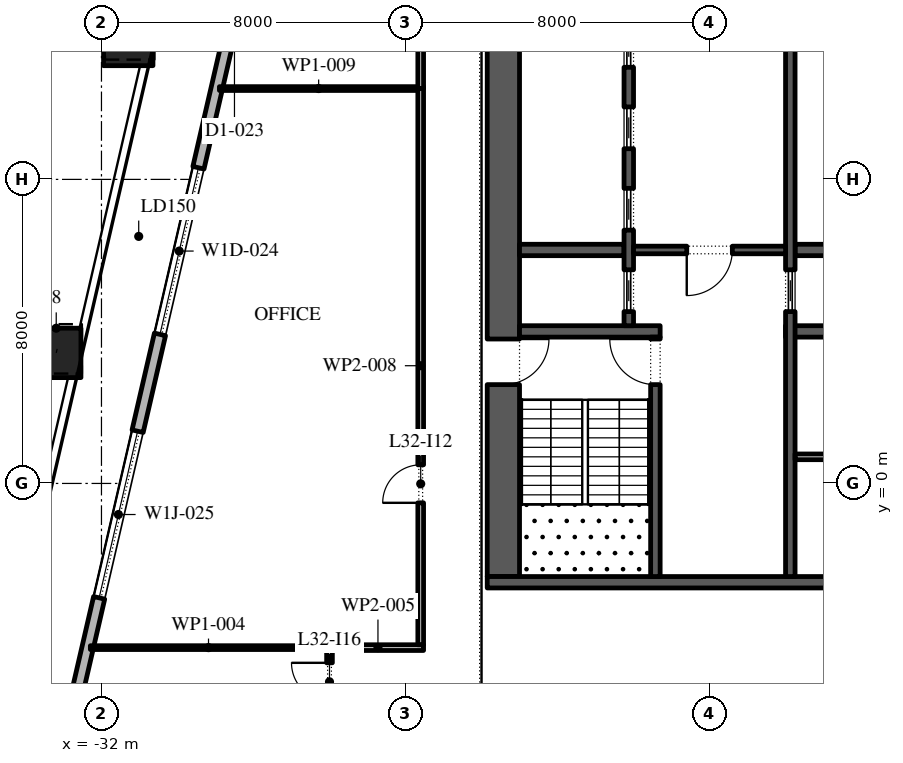
"""IFC4 building model, lengths in metres.
Left out: names, types, materials, properties, quantities, classifications, styles, units other than length and angle.
Written with IfcOpenShell. Run it as: python <this file> out.ifc"""

import sys

from ifc_helpers import new_model, si_unit, direction, frame, frame_2d, origin, origin_2d, place, context, subcontext, project, spatial, rectangle, extrude, element, fill, save


model = new_model("IFC4")
c1 = context("Model", 3, precision=1e-05, world=origin(), true_north=direction((0.0, 1.0)))
c2 = subcontext(c1, "Body", "Model", "MODEL_VIEW")
j1 = project(units=[si_unit("LENGTHUNIT", "METRE"), si_unit("PLANEANGLEUNIT", "RADIAN")], contexts=[c1])
p1 = place(None, origin())
s1 = spatial("IfcSite", under=j1, at=p1, CompositionType="ELEMENT")
p2 = place(p1, origin())
s2 = spatial("IfcBuilding", under=s1, at=p2, CompositionType="ELEMENT")
p3 = place(p2, frame((0.0, 0.0, 147.6)))
s3 = spatial("IfcBuildingStorey", under=s2, at=p3, CompositionType="ELEMENT", Elevation=147.6)
p4 = place(p3, frame((-31.295, 11.642, 0.0), z_axis=(0.008770884695, 0.037929719907, 0.99924191662), x_axis=(-0.974290512438, 0.225295355862, 0.0)))
e1 = element("IfcColumn", 1, at=p4, inside=s3, PredefinedType="COLUMN", context=c2, shape_type="SweptSolid", body=[
    extrude(rectangle(XDim=1.3, YDim=1.3, at=origin_2d()), origin(), (0.0, 0.0, 1.0), 4.203),
])
p5 = place(p3, frame((-33.19, 3.434, 0.0), z_axis=(0.005810975449, 0.025335852957, 0.999662106474), x_axis=(-0.974691740237, 0.22355315143, 0.0)))
e2 = element("IfcColumn", 2, at=p5, inside=s3, PredefinedType="COLUMN", context=c2, shape_type="SweptSolid", body=[
    extrude(rectangle(XDim=1.3, YDim=1.3, at=origin_2d()), origin(), (0.0, 0.0, 1.0), 4.201),
])
p6 = place(p3, frame((-22.82, 37.016, 0.0), z_axis=(0.0, 0.0, 1.0), x_axis=(-0.224953880882, -0.974369412223, 0.0)))
e3 = element("IfcWall", 3, at=p6, inside=s3, PredefinedType="STANDARD", context=c2, shape_type="SweptSolid", body=[
    extrude(rectangle(XDim=49.5, YDim=0.3, at=frame_2d((24.75, 0.0))), origin(), (0.0, 0.0, 1.0), 4.0),
])
p7 = place(p6, frame((1.157, 0.0, 0.45)))
e4 = element("IfcOpeningElement", 4, at=p7, cuts=e3, PredefinedType="OPENING", context=c2, shape_type="SweptSolid", body=[
    extrude(rectangle(XDim=4.5, YDim=3.05, at=frame_2d((2.25, 1.525))), frame((0.0, 0.16, 0.0), z_axis=(0.0, -1.0, 0.0), x_axis=(1.0, 0.0, 0.0)), (0.0, 0.0, 1.0), 0.32),
])
p8 = place(p6, frame((8.121, 0.0, 0.45)))
e5 = element("IfcOpeningElement", 5, at=p8, cuts=e3, PredefinedType="OPENING", context=c2, shape_type="SweptSolid", body=[
    extrude(rectangle(XDim=4.5, YDim=3.05, at=frame_2d((2.25, 1.525))), frame((0.0, 0.16, 0.0), z_axis=(0.0, -1.0, 0.0), x_axis=(1.0, 0.0, 0.0)), (0.0, 0.0, 1.0), 0.32),
])
p9 = place(p6, frame((15.236, 0.0, 0.45)))
e6 = element("IfcOpeningElement", 6, at=p9, cuts=e3, PredefinedType="OPENING", context=c2, shape_type="SweptSolid", body=[
    extrude(rectangle(XDim=4.5, YDim=3.05, at=frame_2d((2.25, 1.525))), frame((0.0, 0.16, 0.0), z_axis=(0.0, -1.0, 0.0), x_axis=(1.0, 0.0, 0.0)), (0.0, 0.0, 1.0), 0.32),
])
p10 = place(p6, frame((23.4, 0.0, 0.0)))
e7 = element("IfcOpeningElement", 7, at=p10, cuts=e3, PredefinedType="OPENING", context=c2, shape_type="SweptSolid", body=[
    extrude(rectangle(XDim=2.4, YDim=3.5, at=frame_2d((1.2, 1.75))), frame((0.0, 0.16, 0.0), z_axis=(0.0, -1.0, 0.0), x_axis=(1.0, 0.0, 0.0)), (0.0, 0.0, 1.0), 0.32),
])
p11 = place(p6, frame((29.464, 0.0, 0.45)))
e8 = element("IfcOpeningElement", 8, at=p11, cuts=e3, PredefinedType="OPENING", context=c2, shape_type="SweptSolid", body=[
    extrude(rectangle(XDim=4.5, YDim=2.875, at=frame_2d((2.25, 1.438))), frame((0.0, 0.16, 0.0), z_axis=(0.0, -1.0, 0.0), x_axis=(1.0, 0.0, 0.0)), (0.0, 0.0, 1.0), 0.32),
])
p12 = place(p6, frame((36.579, 0.0, 0.45)))
e9 = element("IfcOpeningElement", 9, at=p12, cuts=e3, PredefinedType="OPENING", context=c2, shape_type="SweptSolid", body=[
    extrude(rectangle(XDim=4.5, YDim=2.675, at=frame_2d((2.25, 1.337))), frame((0.0, 0.16, 0.0), z_axis=(0.0, -1.0, 0.0), x_axis=(1.0, 0.0, 0.0)), (0.0, 0.0, 1.0), 0.32),
])
p13 = place(p6, frame((43.693, 0.0, 0.45)))
e10 = element("IfcOpeningElement", 10, at=p13, cuts=e3, PredefinedType="OPENING", context=c2, shape_type="SweptSolid", body=[
    extrude(rectangle(XDim=4.5, YDim=3.05, at=frame_2d((2.25, 1.525))), frame((0.0, 0.16, 0.0), z_axis=(0.0, -1.0, 0.0), x_axis=(1.0, 0.0, 0.0)), (0.0, 0.0, 1.0), 0.32),
])
p14 = place(p3, frame((-21.425, -2.45, 0.0), z_axis=(0.0, 0.0, 1.0), x_axis=(0.0, 1.0, 0.0)))
e11 = element("IfcWall", 11, at=p14, inside=s3, PredefinedType="SHEAR", context=c2, shape_type="SweptSolid", body=[
    extrude(rectangle(XDim=27.9, YDim=0.85, at=frame_2d((13.95, 0.0))), origin(), (0.0, 0.0, 1.0), 4.0),
])
p15 = place(p14, frame((5.05, 0.0, 0.0)))
e12 = element("IfcOpeningElement", 12, at=p15, cuts=e11, PredefinedType="OPENING", context=c2, shape_type="SweptSolid", body=[
    extrude(rectangle(XDim=1.2, YDim=2.1, at=frame_2d((0.6, 1.05))), frame((0.0, 0.435, 0.0), z_axis=(0.0, -1.0, 0.0), x_axis=(1.0, 0.0, 0.0)), (0.0, 0.0, 1.0), 0.87),
])
p16 = place(p14, frame((21.65, 0.0, 0.0)))
e13 = element("IfcOpeningElement", 13, at=p16, cuts=e11, PredefinedType="OPENING", context=c2, shape_type="SweptSolid", body=[
    extrude(rectangle(XDim=1.2, YDim=2.1, at=frame_2d((0.6, 1.05))), frame((0.0, 0.435, 0.0), z_axis=(0.0, -1.0, 0.0), x_axis=(1.0, 0.0, 0.0)), (0.0, 0.0, 1.0), 0.87),
])
p17 = place(p3, frame((-21.85, -2.6, 0.0), z_axis=(0.0, 0.0, 1.0), x_axis=(1.0, 0.0, 0.0)))
e14 = element("IfcWall", 14, at=p17, inside=s3, PredefinedType="SHEAR", context=c2, shape_type="SweptSolid", body=[
    extrude(rectangle(XDim=11.7, YDim=0.3, at=frame_2d((5.85, 0.0))), origin(), (0.0, 0.0, 1.0), 4.0),
])
p18 = place(p3, frame((-21.0, 4.0, 0.0), z_axis=(0.0, 0.0, 1.0), x_axis=(1.0, 0.0, 0.0)))
e15 = element("IfcWall", 15, at=p18, inside=s3, PredefinedType="SHEAR", context=c2, shape_type="SweptSolid", body=[
    extrude(rectangle(XDim=3.7, YDim=0.3, at=frame_2d((1.85, 0.0))), origin(), (0.0, 0.0, 1.0), 4.0),
])
p19 = place(p3, frame((-17.425, -2.45, 0.0), z_axis=(0.0, 0.0, 1.0), x_axis=(0.0, 1.0, 0.0)))
e16 = element("IfcWall", 16, at=p19, inside=s3, PredefinedType="SHEAR", context=c2, shape_type="SweptSolid", body=[
    extrude(rectangle(XDim=6.3, YDim=0.25, at=frame_2d((3.15, 0.0))), origin(), (0.0, 0.0, 1.0), 4.0),
])
p20 = place(p19, frame((5.05, 0.0, 0.0)))
e17 = element("IfcOpeningElement", 17, at=p20, cuts=e16, PredefinedType="OPENING", context=c2, shape_type="SweptSolid", body=[
    extrude(rectangle(XDim=1.2, YDim=2.1, at=frame_2d((0.6, 1.05))), frame((0.0, 0.135, 0.0), z_axis=(0.0, -1.0, 0.0), x_axis=(1.0, 0.0, 0.0)), (0.0, 0.0, 1.0), 0.27),
])
p21 = place(p3, frame((-21.0, 6.143, 0.0), z_axis=(0.0, 0.0, 1.0), x_axis=(1.0, 0.0, 0.0)))
e18 = element("IfcWall", 18, at=p21, inside=s3, PredefinedType="SHEAR", context=c2, shape_type="SweptSolid", body=[
    extrude(rectangle(XDim=2.75, YDim=0.3, at=frame_2d((1.375, 0.0))), origin(), (0.0, 0.0, 1.0), 4.0),
])
p22 = place(p3, frame((-18.125, 4.15, 0.0), z_axis=(0.0, 0.0, 1.0), x_axis=(0.0, 1.0, 0.0)))
e19 = element("IfcWall", 19, at=p22, inside=s3, PredefinedType="SHEAR", context=c2, shape_type="SweptSolid", body=[
    extrude(rectangle(XDim=14.7, YDim=0.25, at=frame_2d((7.35, 0.0))), origin(), (0.0, 0.0, 1.0), 4.0),
])
p23 = place(p22, frame((0.371, 0.0, 0.0)))
e20 = element("IfcOpeningElement", 20, at=p23, cuts=e19, PredefinedType="OPENING", context=c2, shape_type="SweptSolid", body=[
    extrude(rectangle(XDim=1.1, YDim=2.1, at=frame_2d((0.55, 1.05))), frame((0.0, 0.135, 0.0), z_axis=(0.0, -1.0, 0.0), x_axis=(1.0, 0.0, 0.0)), (0.0, 0.0, 1.0), 0.27),
])
p24 = place(p22, frame((2.514, 0.0, 0.0)))
e21 = element("IfcOpeningElement", 21, at=p24, cuts=e19, PredefinedType="OPENING", context=c2, shape_type="SweptSolid", body=[
    extrude(rectangle(XDim=1.1, YDim=2.1, at=frame_2d((0.55, 1.05))), frame((0.0, 0.135, 0.0), z_axis=(0.0, -1.0, 0.0), x_axis=(1.0, 0.0, 0.0)), (0.0, 0.0, 1.0), 0.27),
])
p25 = place(p22, frame((4.657, 0.0, 0.0)))
e22 = element("IfcOpeningElement", 22, at=p25, cuts=e19, PredefinedType="OPENING", context=c2, shape_type="SweptSolid", body=[
    extrude(rectangle(XDim=1.1, YDim=2.1, at=frame_2d((0.55, 1.05))), frame((0.0, 0.135, 0.0), z_axis=(0.0, -1.0, 0.0), x_axis=(1.0, 0.0, 0.0)), (0.0, 0.0, 1.0), 0.27),
])
p26 = place(p22, frame((6.8, 0.0, 0.0)))
e23 = element("IfcOpeningElement", 23, at=p26, cuts=e19, PredefinedType="OPENING", context=c2, shape_type="SweptSolid", body=[
    extrude(rectangle(XDim=1.1, YDim=2.1, at=frame_2d((0.55, 1.05))), frame((0.0, 0.135, 0.0), z_axis=(0.0, -1.0, 0.0), x_axis=(1.0, 0.0, 0.0)), (0.0, 0.0, 1.0), 0.27),
])
p27 = place(p22, frame((8.943, 0.0, 0.0)))
e24 = element("IfcOpeningElement", 24, at=p27, cuts=e19, PredefinedType="OPENING", context=c2, shape_type="SweptSolid", body=[
    extrude(rectangle(XDim=1.1, YDim=2.1, at=frame_2d((0.55, 1.05))), frame((0.0, 0.135, 0.0), z_axis=(0.0, -1.0, 0.0), x_axis=(1.0, 0.0, 0.0)), (0.0, 0.0, 1.0), 0.27),
])
p28 = place(p22, frame((11.086, 0.0, 0.0)))
e25 = element("IfcOpeningElement", 25, at=p28, cuts=e19, PredefinedType="OPENING", context=c2, shape_type="SweptSolid", body=[
    extrude(rectangle(XDim=1.1, YDim=2.1, at=frame_2d((0.55, 1.05))), frame((0.0, 0.135, 0.0), z_axis=(0.0, -1.0, 0.0), x_axis=(1.0, 0.0, 0.0)), (0.0, 0.0, 1.0), 0.27),
])
p29 = place(p22, frame((13.229, 0.0, 0.0)))
e26 = element("IfcOpeningElement", 26, at=p29, cuts=e19, PredefinedType="OPENING", context=c2, shape_type="SweptSolid", body=[
    extrude(rectangle(XDim=1.1, YDim=2.1, at=frame_2d((0.55, 1.05))), frame((0.0, 0.135, 0.0), z_axis=(0.0, -1.0, 0.0), x_axis=(1.0, 0.0, 0.0)), (0.0, 0.0, 1.0), 0.27),
])
p30 = place(p3, frame((-14.0, 4.0, 0.0), z_axis=(0.0, 0.0, 1.0), x_axis=(1.0, 0.0, 0.0)))
e27 = element("IfcWall", 27, at=p30, inside=s3, PredefinedType="SHEAR", context=c2, shape_type="SweptSolid", body=[
    extrude(rectangle(XDim=3.0, YDim=0.3, at=frame_2d((1.5, 0.0))), origin(), (0.0, 0.0, 1.0), 4.0),
])
p31 = place(p3, frame((-13.75, 6.143, 0.0), z_axis=(0.0, 0.0, 1.0), x_axis=(1.0, 0.0, 0.0)))
e28 = element("IfcWall", 28, at=p31, inside=s3, PredefinedType="SHEAR", context=c2, shape_type="SweptSolid", body=[
    extrude(rectangle(XDim=2.75, YDim=0.3, at=frame_2d((1.375, 0.0))), origin(), (0.0, 0.0, 1.0), 4.0),
])
p32 = place(p3, frame((-13.875, -2.45, 0.0), z_axis=(0.0, 0.0, 1.0), x_axis=(0.0, 1.0, 0.0)))
e29 = element("IfcWall", 29, at=p32, inside=s3, PredefinedType="SHEAR", context=c2, shape_type="SweptSolid", body=[
    extrude(rectangle(XDim=21.3, YDim=0.25, at=frame_2d((10.65, 0.0))), origin(), (0.0, 0.0, 1.0), 4.0),
])
p33 = place(p32, frame((14.571, 0.0, 0.0)))
e30 = element("IfcOpeningElement", 30, at=p33, cuts=e29, PredefinedType="OPENING", context=c2, shape_type="SweptSolid", body=[
    extrude(rectangle(XDim=0.9, YDim=2.1, at=frame_2d((0.45, 1.05))), frame((0.0, 0.135, 0.0), z_axis=(0.0, -1.0, 0.0), x_axis=(1.0, 0.0, 0.0)), (0.0, 0.0, 1.0), 0.27),
])
p34 = place(p32, frame((6.971, 0.0, 0.0)))
e31 = element("IfcOpeningElement", 31, at=p34, cuts=e29, PredefinedType="OPENING", context=c2, shape_type="SweptSolid", body=[
    extrude(rectangle(XDim=1.1, YDim=2.1, at=frame_2d((0.55, 1.05))), frame((0.0, 0.135, 0.0), z_axis=(0.0, -1.0, 0.0), x_axis=(1.0, 0.0, 0.0)), (0.0, 0.0, 1.0), 0.27),
])
p35 = place(p3, frame((-18.0, 6.143, 0.0), z_axis=(0.0, 0.0, 1.0), x_axis=(1.0, 0.0, 0.0)))
e32 = element("IfcWall", 32, at=p35, inside=s3, PredefinedType="SHEAR", context=c2, shape_type="SweptSolid", body=[
    extrude(rectangle(XDim=4.0, YDim=0.2, at=frame_2d((2.0, 0.0))), origin(), (0.0, 0.0, 1.0), 4.0),
])
p36 = place(p35, frame((1.4, 0.0, 0.0)))
e33 = element("IfcOpeningElement", 33, at=p36, cuts=e32, PredefinedType="OPENING", context=c2, shape_type="SweptSolid", body=[
    extrude(rectangle(XDim=1.2, YDim=2.1, at=frame_2d((0.6, 1.05))), frame((0.0, 0.11, 0.0), z_axis=(0.0, -1.0, 0.0), x_axis=(1.0, 0.0, 0.0)), (0.0, 0.0, 1.0), 0.22),
])
p37 = place(p3, frame((-13.75, 0.7, 0.0), z_axis=(0.0, 0.0, 1.0), x_axis=(1.0, 0.0, 0.0)))
e34 = element("IfcWall", 34, at=p37, inside=s3, PredefinedType="PARTITIONING", context=c2, shape_type="SweptSolid", body=[
    extrude(rectangle(XDim=2.75, YDim=0.15, at=frame_2d((1.375, 0.0))), origin(), (0.0, 0.0, 1.0), 4.0),
])
p38 = place(p3, frame((-26.0, -7.365, 0.0), z_axis=(0.0, 0.0, 1.0), x_axis=(0.0, 1.0, 0.0)))
e35 = element("IfcWall", 35, at=p38, inside=s3, PredefinedType="PARTITIONING", context=c2, shape_type="SweptSolid", body=[
    extrude(rectangle(XDim=3.095, YDim=0.15, at=frame_2d((1.547, 0.0))), origin(), (0.0, 0.0, 1.0), 4.0),
])
p39 = place(p38, frame((1.645, 0.0, 0.0)))
e36 = element("IfcOpeningElement", 36, at=p39, cuts=e35, PredefinedType="OPENING", context=c2, shape_type="SweptSolid", body=[
    extrude(rectangle(XDim=1.0, YDim=2.1, at=frame_2d((0.5, 1.05))), frame((0.0, 0.085, 0.0), z_axis=(0.0, -1.0, 0.0), x_axis=(1.0, 0.0, 0.0)), (0.0, 0.0, 1.0), 0.17),
])
p40 = place(p3, frame((-26.075, -4.32, 0.0), z_axis=(0.0, 0.0, 1.0), x_axis=(-1.0, 0.0, 0.0)))
e37 = element("IfcWall", 37, at=p40, inside=s3, PredefinedType="PARTITIONING", context=c2, shape_type="SweptSolid", body=[
    extrude(rectangle(XDim=6.217, YDim=0.1, at=frame_2d((3.108, 0.0))), origin(), (0.0, 0.0, 1.0), 4.0),
])
p41 = place(p3, frame((-25.925, -4.32, 0.0), z_axis=(0.0, 0.0, 1.0), x_axis=(1.0, 0.0, 0.0)))
e38 = element("IfcWall", 38, at=p41, inside=s3, PredefinedType="PARTITIONING", context=c2, shape_type="SweptSolid", body=[
    extrude(rectangle(XDim=2.4, YDim=0.15, at=frame_2d((1.2, 0.0))), origin(), (0.0, 0.0, 1.0), 4.0),
])
p42 = place(p3, frame((-23.6, -4.245, 0.0), z_axis=(0.0, 0.0, 1.0), x_axis=(0.0, 1.0, 0.0)))
e39 = element("IfcWall", 39, at=p42, inside=s3, PredefinedType="PARTITIONING", context=c2, shape_type="SweptSolid", body=[
    extrude(rectangle(XDim=14.685, YDim=0.15, at=frame_2d((7.343, 0.0))), origin(), (0.0, 0.0, 1.0), 4.0),
])
p43 = place(p42, frame((3.735, 0.0, 0.0)))
e40 = element("IfcOpeningElement", 40, at=p43, cuts=e39, PredefinedType="OPENING", context=c2, shape_type="SweptSolid", body=[
    extrude(rectangle(XDim=1.0, YDim=2.1, at=frame_2d((0.5, 1.05))), frame((0.0, 0.085, 0.0), z_axis=(0.0, -1.0, 0.0), x_axis=(1.0, 0.0, 0.0)), (0.0, 0.0, 1.0), 0.17),
])
p44 = place(p3, frame((-23.675, 10.39, 0.0), z_axis=(0.0, 0.0, 1.0), x_axis=(-1.0, 0.0, 0.0)))
e41 = element("IfcWall", 41, at=p44, inside=s3, PredefinedType="PARTITIONING", context=c2, shape_type="SweptSolid", body=[
    extrude(rectangle(XDim=5.221, YDim=0.1, at=frame_2d((2.61, 0.0))), origin(), (0.0, 0.0, 1.0), 4.0),
])
p45 = place(p3, frame((-23.6, 10.39, 0.0), z_axis=(0.0, 0.0, 1.0), x_axis=(0.0, 1.0, 0.0)))
e42 = element("IfcWall", 42, at=p45, inside=s3, PredefinedType="PARTITIONING", context=c2, shape_type="SweptSolid", body=[
    extrude(rectangle(XDim=13.095, YDim=0.15, at=frame_2d((6.548, 0.0))), origin(), (0.0, 0.0, 1.0), 4.0),
])
p46 = place(p45, frame((8.62, 0.0, 0.0)))
e43 = element("IfcOpeningElement", 43, at=p46, cuts=e42, PredefinedType="OPENING", context=c2, shape_type="SweptSolid", body=[
    extrude(rectangle(XDim=1.0, YDim=2.1, at=frame_2d((0.5, 1.05))), frame((0.0, 0.085, 0.0), z_axis=(0.0, -1.0, 0.0), x_axis=(1.0, 0.0, 0.0)), (0.0, 0.0, 1.0), 0.17),
])
p47 = place(p11, origin())
e44 = element("IfcWindow", 44, at=p47, inside=s3, PartitioningType="DOUBLE_PANEL_VERTICAL", PredefinedType="WINDOW", context=c2, shape_type="SweptSolid", body=[
    extrude(rectangle(XDim=4.5, YDim=2.875, at=frame_2d((2.25, 1.438))), frame((0.0, 0.03, 0.0), z_axis=(0.0, -1.0, 0.0), x_axis=(1.0, 0.0, 0.0)), (0.0, 0.0, 1.0), 0.06),
])
fill(e8, e44)
p48 = place(p12, origin())
e45 = element("IfcWindow", 45, at=p48, inside=s3, PartitioningType="DOUBLE_PANEL_VERTICAL", PredefinedType="WINDOW", context=c2, shape_type="SweptSolid", body=[
    extrude(rectangle(XDim=4.5, YDim=2.675, at=frame_2d((2.25, 1.337))), frame((0.0, 0.03, 0.0), z_axis=(0.0, -1.0, 0.0), x_axis=(1.0, 0.0, 0.0)), (0.0, 0.0, 1.0), 0.06),
])
fill(e9, e45)
p49 = place(p23, origin())
e46 = element("IfcDoor", 46, at=p49, inside=s3, OperationType="SLIDING_TO_LEFT", PredefinedType="DOOR", context=c2, shape_type="SweptSolid", body=[
    extrude(rectangle(XDim=1.1, YDim=2.1, at=frame_2d((0.55, 1.05))), frame((0.0, 0.025, 0.0), z_axis=(0.0, -1.0, 0.0), x_axis=(1.0, 0.0, 0.0)), (0.0, 0.0, 1.0), 0.05),
])
fill(e20, e46)
p50 = place(p24, origin())
e47 = element("IfcDoor", 47, at=p50, inside=s3, OperationType="SLIDING_TO_LEFT", PredefinedType="DOOR", context=c2, shape_type="SweptSolid", body=[
    extrude(rectangle(XDim=1.1, YDim=2.1, at=frame_2d((0.55, 1.05))), frame((0.0, 0.025, 0.0), z_axis=(0.0, -1.0, 0.0), x_axis=(1.0, 0.0, 0.0)), (0.0, 0.0, 1.0), 0.05),
])
fill(e21, e47)
p51 = place(p25, origin())
e48 = element("IfcDoor", 48, at=p51, inside=s3, OperationType="SLIDING_TO_LEFT", PredefinedType="DOOR", context=c2, shape_type="SweptSolid", body=[
    extrude(rectangle(XDim=1.1, YDim=2.1, at=frame_2d((0.55, 1.05))), frame((0.0, 0.025, 0.0), z_axis=(0.0, -1.0, 0.0), x_axis=(1.0, 0.0, 0.0)), (0.0, 0.0, 1.0), 0.05),
])
fill(e22, e48)
p52 = place(p26, origin())
e49 = element("IfcDoor", 49, at=p52, inside=s3, OperationType="SLIDING_TO_LEFT", PredefinedType="DOOR", context=c2, shape_type="SweptSolid", body=[
    extrude(rectangle(XDim=1.1, YDim=2.1, at=frame_2d((0.55, 1.05))), frame((0.0, 0.025, 0.0), z_axis=(0.0, -1.0, 0.0), x_axis=(1.0, 0.0, 0.0)), (0.0, 0.0, 1.0), 0.05),
])
fill(e23, e49)
p53 = place(p34, origin())
e50 = element("IfcDoor", 50, at=p53, inside=s3, OperationType="SLIDING_TO_LEFT", PredefinedType="DOOR", context=c2, shape_type="SweptSolid", body=[
    extrude(rectangle(XDim=1.1, YDim=2.1, at=frame_2d((0.55, 1.05))), frame((0.0, 0.025, 0.0), z_axis=(0.0, -1.0, 0.0), x_axis=(1.0, 0.0, 0.0)), (0.0, 0.0, 1.0), 0.05),
])
fill(e31, e50)
p54 = place(p36, frame((1.2, 0.0, 0.0), z_axis=(0.0, 0.0, 1.0), x_axis=(-1.0, 0.0, 0.0)))
e51 = element("IfcDoor", 51, at=p54, inside=s3, OperationType="SINGLE_SWING_LEFT", PredefinedType="DOOR", context=c2, shape_type="SweptSolid", body=[
    extrude(rectangle(XDim=1.2, YDim=2.1, at=frame_2d((0.6, 1.05))), frame((0.0, 0.025, 0.0), z_axis=(0.0, -1.0, 0.0), x_axis=(1.0, 0.0, 0.0)), (0.0, 0.0, 1.0), 0.05),
])
fill(e33, e51)
p55 = place(p20, origin())
e52 = element("IfcDoor", 52, at=p55, inside=s3, OperationType="SINGLE_SWING_LEFT", PredefinedType="DOOR", context=c2, shape_type="SweptSolid", body=[
    extrude(rectangle(XDim=1.2, YDim=2.1, at=frame_2d((0.6, 1.05))), frame((0.0, 0.025, 0.0), z_axis=(0.0, -1.0, 0.0), x_axis=(1.0, 0.0, 0.0)), (0.0, 0.0, 1.0), 0.05),
])
fill(e17, e52)
p56 = place(p15, frame((1.2, 0.0, 0.0), z_axis=(0.0, 0.0, 1.0), x_axis=(-1.0, 0.0, 0.0)))
e53 = element("IfcDoor", 53, at=p56, inside=s3, OperationType="SINGLE_SWING_RIGHT", PredefinedType="DOOR", context=c2, shape_type="SweptSolid", body=[
    extrude(rectangle(XDim=1.2, YDim=2.1, at=frame_2d((0.6, 1.05))), frame((0.0, 0.025, 0.0), z_axis=(0.0, -1.0, 0.0), x_axis=(1.0, 0.0, 0.0)), (0.0, 0.0, 1.0), 0.05),
])
fill(e12, e53)
p57 = place(p43, origin())
e54 = element("IfcDoor", 54, at=p57, inside=s3, OperationType="SINGLE_SWING_RIGHT", PredefinedType="DOOR", context=c2, shape_type="SweptSolid", body=[
    extrude(rectangle(XDim=1.0, YDim=2.1, at=frame_2d((0.5, 1.05))), frame((0.0, 0.025, 0.0), z_axis=(0.0, -1.0, 0.0), x_axis=(1.0, 0.0, 0.0)), (0.0, 0.0, 1.0), 0.05),
])
fill(e40, e54)
p58 = place(p39, origin())
e55 = element("IfcDoor", 55, at=p58, inside=s3, OperationType="SINGLE_SWING_LEFT", PredefinedType="DOOR", context=c2, shape_type="SweptSolid", body=[
    extrude(rectangle(XDim=1.0, YDim=2.1, at=frame_2d((0.5, 1.05))), frame((0.0, 0.025, 0.0), z_axis=(0.0, -1.0, 0.0), x_axis=(1.0, 0.0, 0.0)), (0.0, 0.0, 1.0), 0.05),
])
fill(e36, e55)
save(model, sys.argv[1])
